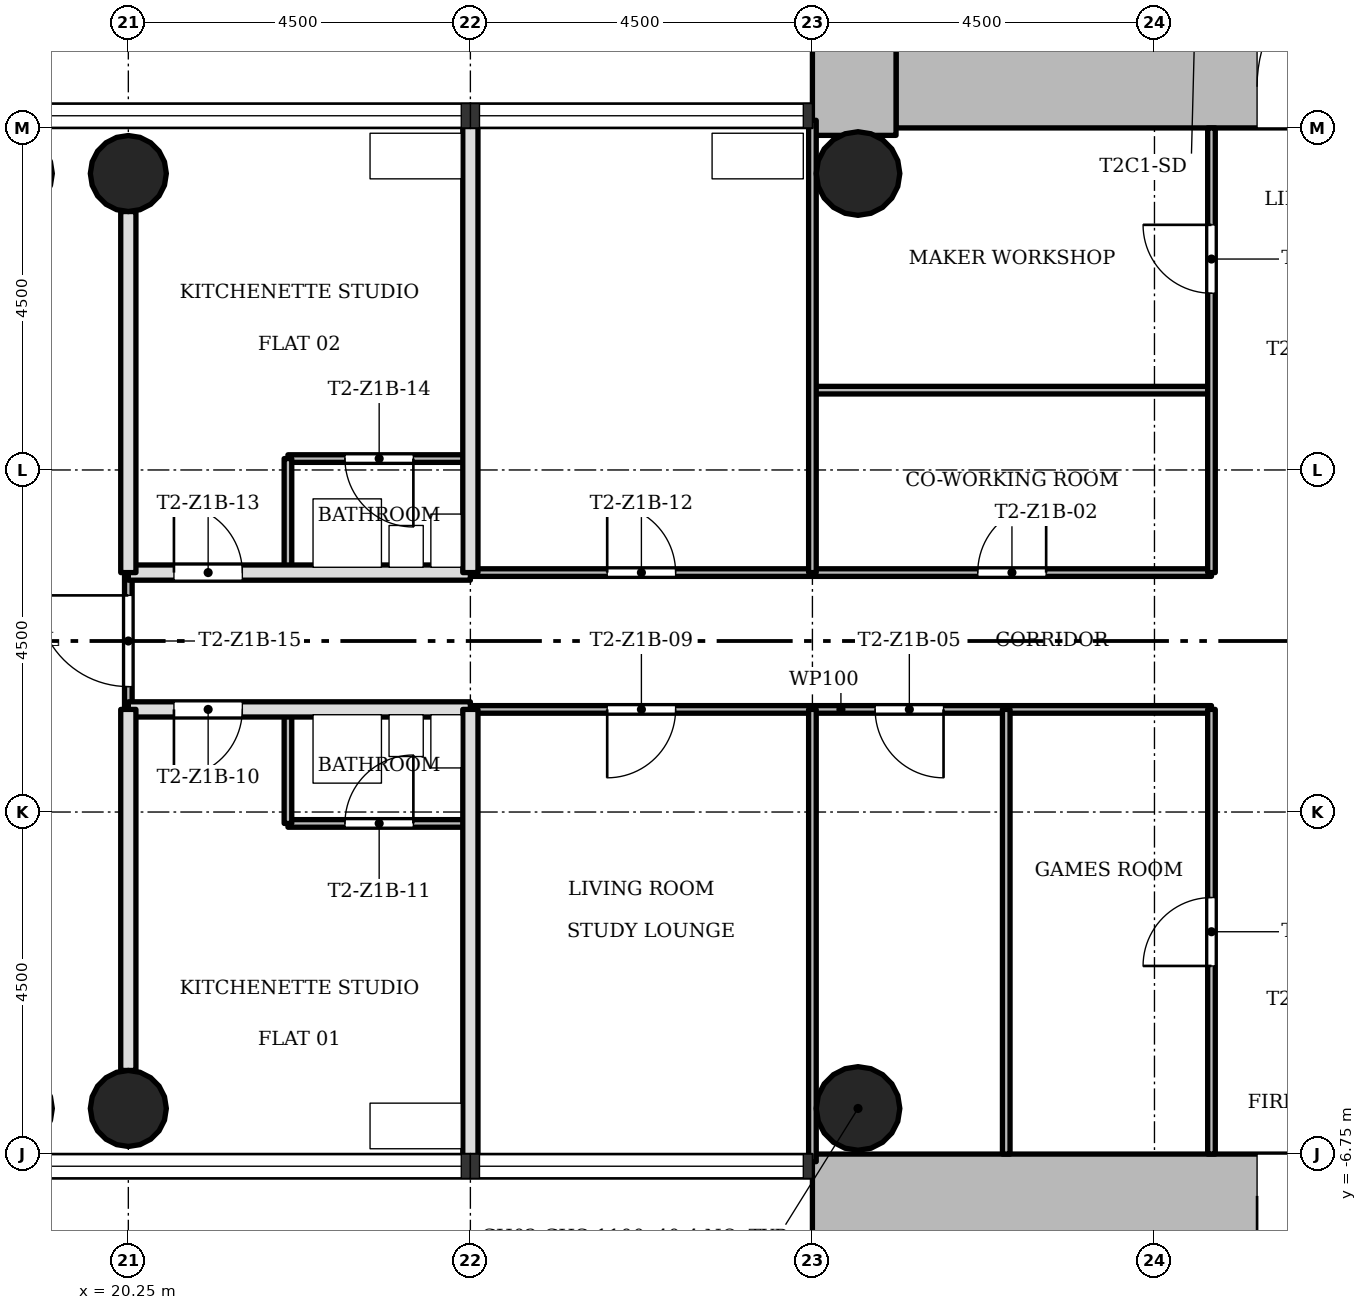
"""IFC4 building model, lengths in metres.
Left out: names, types, materials, properties, quantities, classifications, styles, units other than length and angle.
Written with IfcOpenShell. Run it as: python <this file> out.ifc"""

import sys

from ifc_helpers import new_model, si_unit, direction, frame, frame_2d, origin, origin_2d, place, context, subcontext, project, spatial, rectangle, hollow_circle, extrude, element, fill, save


model = new_model("IFC4")
c1 = context("Model", 3, precision=1e-05, world=origin(), true_north=direction((0.0, 1.0)))
c2 = subcontext(c1, "Body", "Model", "MODEL_VIEW")
j1 = project(units=[si_unit("LENGTHUNIT", "METRE"), si_unit("PLANEANGLEUNIT", "RADIAN")], contexts=[c1])
p1 = place(None, origin())
s1 = spatial("IfcSite", under=j1, at=p1, CompositionType="ELEMENT")
p2 = place(p1, origin())
s2 = spatial("IfcBuilding", under=s1, at=p2, CompositionType="ELEMENT")
p3 = place(p2, frame((0.0, 0.0, 34.7)))
s3 = spatial("IfcBuildingStorey", under=s2, at=p3, CompositionType="ELEMENT", Elevation=34.7)
p4 = place(p3, frame((30.35, 7.3, 0.0), z_axis=(0.0, 0.0, 1.0), x_axis=(1.0, 0.0, 0.0)))
e1 = element("IfcWall", 1, at=p4, inside=s3, PredefinedType="SHEAR", context=c2, shape_type="SweptSolid", body=[
    extrude(rectangle(XDim=12.4, YDim=1.1, at=frame_2d((6.2, 0.0))), origin(), (0.0, 0.0, 1.0), 3.4),
])
p5 = place(p4, frame((4.75, 0.0, 0.0)))
e2 = element("IfcOpeningElement", 2, at=p5, cuts=e1, PredefinedType="OPENING", context=c2, shape_type="SweptSolid", body=[
    extrude(rectangle(XDim=1.8, YDim=2.1, at=frame_2d((0.9, 1.05))), frame((0.0, 0.56, 0.0), z_axis=(0.0, -1.0, 0.0), x_axis=(1.0, 0.0, 0.0)), (0.0, 0.0, 1.0), 1.12),
])
p6 = place(p3, frame((29.8, 15.248, 0.0), z_axis=(0.0, 0.0, 1.0), x_axis=(0.0, -1.0, 0.0)))
e3 = element("IfcWall", 3, at=p6, inside=s3, PredefinedType="SHEAR", context=c2, shape_type="SweptSolid", body=[
    extrude(rectangle(XDim=8.596, YDim=1.1, at=frame_2d((4.298, 0.0))), origin(), (0.0, 0.0, 1.0), 3.4),
])
p7 = place(p3, frame((41.65, -7.3, 0.0), z_axis=(0.0, 0.0, 1.0), x_axis=(-1.0, 0.0, 0.0)))
e4 = element("IfcWall", 4, at=p7, inside=s3, PredefinedType="SHEAR", context=c2, shape_type="SweptSolid", body=[
    extrude(rectangle(XDim=12.4, YDim=1.1, at=frame_2d((6.2, 0.0))), origin(), (0.0, 0.0, 1.0), 3.4),
])
p8 = place(p7, frame((4.75, 0.0, 0.0)))
e5 = element("IfcOpeningElement", 5, at=p8, cuts=e4, PredefinedType="OPENING", context=c2, shape_type="SweptSolid", body=[
    extrude(rectangle(XDim=1.8, YDim=2.1, at=frame_2d((0.9, 1.05))), frame((0.0, 0.56, 0.0), z_axis=(0.0, -1.0, 0.0), x_axis=(1.0, 0.0, 0.0)), (0.0, 0.0, 1.0), 1.12),
])
for number, where, z_axis, x_axis in (
    (6, (20.25, 6.15, 0.0), (0.0, 0.0, 1.0), (1.0, 0.0, 0.0)),
    (7, (20.25, -6.15, 0.0), (0.0, 0.0, 1.0), (1.0, 0.0, 0.0)),
):
    element("IfcColumn", number, at=place(p3, frame(where, z_axis=z_axis, x_axis=x_axis)), inside=s3, PredefinedType="COLUMN", context=c2, shape_type="SweptSolid", body=[
        extrude(hollow_circle(Radius=0.5, WallThickness=0.036, at=origin_2d()), origin(), (0.0, 0.0, 1.0), 3.4),
    ])
for number, where, z_axis, x_axis in (
    (8, (29.85, 6.15, 0.0), (0.0, 0.0, 1.0), (1.0, 0.0, 0.0)),
    (9, (29.85, -6.15, 0.0), (0.0, 0.0, 1.0), (1.0, 0.0, 0.0)),
):
    element("IfcColumn", number, at=place(p3, frame(where, z_axis=z_axis, x_axis=x_axis)), inside=s3, PredefinedType="COLUMN", context=c2, shape_type="SweptSolid", body=[
        extrude(hollow_circle(Radius=0.55, WallThickness=0.04, at=origin_2d()), origin(), (0.0, 0.0, 1.0), 3.4),
    ])
p9 = place(p3, frame((24.75, -2.4, 0.0), z_axis=(0.0, 0.0, 1.0), x_axis=(-1.0, 0.0, 0.0)))
e10 = element("IfcWall", 10, at=p9, inside=s3, PredefinedType="PARTITIONING", context=c2, shape_type="SweptSolid", body=[
    extrude(rectangle(XDim=2.4, YDim=0.1, at=frame_2d((1.2, 0.0))), origin(), (0.0, 0.0, 1.0), 3.0),
])
p10 = place(p9, frame((0.75, 0.0, 0.0)))
e11 = element("IfcOpeningElement", 11, at=p10, cuts=e10, PredefinedType="OPENING", context=c2, shape_type="SweptSolid", body=[
    extrude(rectangle(XDim=0.9, YDim=2.1, at=frame_2d((0.45, 1.05))), frame((0.0, 0.06, 0.0), z_axis=(0.0, -1.0, 0.0), x_axis=(1.0, 0.0, 0.0)), (0.0, 0.0, 1.0), 0.12),
])
p11 = place(p3, frame((34.5, -0.9, 0.0), z_axis=(0.0, 0.0, 1.0), x_axis=(-1.0, 0.0, 0.0)))
e12 = element("IfcWall", 12, at=p11, inside=s3, PredefinedType="PARTITIONING", context=c2, shape_type="SweptSolid", body=[
    extrude(rectangle(XDim=9.75, YDim=0.1, at=frame_2d((4.875, 0.0))), origin(), (0.0, 0.0, 1.0), 3.0),
])
p12 = place(p11, frame((3.525, 0.0, 0.0)))
e13 = element("IfcOpeningElement", 13, at=p12, cuts=e12, PredefinedType="OPENING", context=c2, shape_type="SweptSolid", body=[
    extrude(rectangle(XDim=0.9, YDim=2.1, at=frame_2d((0.45, 1.05))), frame((0.0, 0.06, 0.0), z_axis=(0.0, -1.0, 0.0), x_axis=(1.0, 0.0, 0.0)), (0.0, 0.0, 1.0), 0.12),
])
p13 = place(p11, frame((7.05, 0.0, 0.0)))
e14 = element("IfcOpeningElement", 14, at=p13, cuts=e12, PredefinedType="OPENING", context=c2, shape_type="SweptSolid", body=[
    extrude(rectangle(XDim=0.9, YDim=2.1, at=frame_2d((0.45, 1.05))), frame((0.0, 0.06, 0.0), z_axis=(0.0, -1.0, 0.0), x_axis=(1.0, 0.0, 0.0)), (0.0, 0.0, 1.0), 0.12),
])
p14 = place(p3, frame((24.75, -0.9, 0.0), z_axis=(0.0, 0.0, 1.0), x_axis=(-1.0, 0.0, 0.0)))
e15 = element("IfcWall", 15, at=p14, inside=s3, PredefinedType="SOLIDWALL", context=c2, shape_type="SweptSolid", body=[
    extrude(rectangle(XDim=4.5, YDim=0.2, at=frame_2d((2.25, 0.0))), origin(), (0.0, 0.0, 1.0), 3.0),
])
p15 = place(p14, frame((3.0, 0.0, 0.0)))
e16 = element("IfcOpeningElement", 16, at=p15, cuts=e15, PredefinedType="OPENING", context=c2, shape_type="SweptSolid", body=[
    extrude(rectangle(XDim=0.9, YDim=2.1, at=frame_2d((0.45, 1.05))), frame((0.0, 0.11, 0.0), z_axis=(0.0, -1.0, 0.0), x_axis=(1.0, 0.0, 0.0)), (0.0, 0.0, 1.0), 0.22),
])
p16 = place(p3, frame((34.5, 0.9, 0.0), z_axis=(0.0, 0.0, 1.0), x_axis=(-1.0, 0.0, 0.0)))
e17 = element("IfcWall", 17, at=p16, inside=s3, PredefinedType="PARTITIONING", context=c2, shape_type="SweptSolid", body=[
    extrude(rectangle(XDim=9.75, YDim=0.1, at=frame_2d((4.875, 0.0))), origin(), (0.0, 0.0, 1.0), 3.0),
])
p17 = place(p16, frame((2.175, 0.0, 0.0)))
e18 = element("IfcOpeningElement", 18, at=p17, cuts=e17, PredefinedType="OPENING", context=c2, shape_type="SweptSolid", body=[
    extrude(rectangle(XDim=0.9, YDim=2.1, at=frame_2d((0.45, 1.05))), frame((0.0, 0.06, 0.0), z_axis=(0.0, -1.0, 0.0), x_axis=(1.0, 0.0, 0.0)), (0.0, 0.0, 1.0), 0.12),
])
p18 = place(p16, frame((7.05, 0.0, 0.0)))
e19 = element("IfcOpeningElement", 19, at=p18, cuts=e17, PredefinedType="OPENING", context=c2, shape_type="SweptSolid", body=[
    extrude(rectangle(XDim=0.9, YDim=2.1, at=frame_2d((0.45, 1.05))), frame((0.0, 0.06, 0.0), z_axis=(0.0, -1.0, 0.0), x_axis=(1.0, 0.0, 0.0)), (0.0, 0.0, 1.0), 0.12),
])
p19 = place(p3, frame((24.75, 0.9, 0.0), z_axis=(0.0, 0.0, 1.0), x_axis=(-1.0, 0.0, 0.0)))
e20 = element("IfcWall", 20, at=p19, inside=s3, PredefinedType="SOLIDWALL", context=c2, shape_type="SweptSolid", body=[
    extrude(rectangle(XDim=4.5, YDim=0.2, at=frame_2d((2.25, 0.0))), origin(), (0.0, 0.0, 1.0), 3.0),
])
p20 = place(p19, frame((3.0, 0.0, 0.0)))
e21 = element("IfcOpeningElement", 21, at=p20, cuts=e20, PredefinedType="OPENING", context=c2, shape_type="SweptSolid", body=[
    extrude(rectangle(XDim=0.9, YDim=2.1, at=frame_2d((0.45, 1.05))), frame((0.0, 0.11, 0.0), z_axis=(0.0, -1.0, 0.0), x_axis=(1.0, 0.0, 0.0)), (0.0, 0.0, 1.0), 0.22),
])
p21 = place(p3, frame((24.75, 2.4, 0.0), z_axis=(0.0, 0.0, 1.0), x_axis=(-1.0, 0.0, 0.0)))
e22 = element("IfcWall", 22, at=p21, inside=s3, PredefinedType="PARTITIONING", context=c2, shape_type="SweptSolid", body=[
    extrude(rectangle(XDim=2.4, YDim=0.1, at=frame_2d((1.2, 0.0))), origin(), (0.0, 0.0, 1.0), 3.0),
])
p22 = place(p21, frame((0.75, 0.0, 0.0)))
e23 = element("IfcOpeningElement", 23, at=p22, cuts=e22, PredefinedType="OPENING", context=c2, shape_type="SweptSolid", body=[
    extrude(rectangle(XDim=0.9, YDim=2.1, at=frame_2d((0.45, 1.05))), frame((0.0, 0.06, 0.0), z_axis=(0.0, -1.0, 0.0), x_axis=(1.0, 0.0, 0.0)), (0.0, 0.0, 1.0), 0.12),
])
p23 = place(p3, frame((34.5, 3.3, 0.0), z_axis=(0.0, 0.0, 1.0), x_axis=(-1.0, 0.0, 0.0)))
e24 = element("IfcWall", 24, at=p23, inside=s3, PredefinedType="PARTITIONING", context=c2, shape_type="SweptSolid", body=[
    extrude(rectangle(XDim=5.25, YDim=0.1, at=frame_2d((2.625, 0.0))), origin(), (0.0, 0.0, 1.0), 3.0),
])
p24 = place(p3, frame((34.5, -6.75, 0.0), z_axis=(0.0, 0.0, 1.0), x_axis=(0.0, 1.0, 0.0)))
e25 = element("IfcWall", 25, at=p24, inside=s3, PredefinedType="PARTITIONING", context=c2, shape_type="SweptSolid", body=[
    extrude(rectangle(XDim=5.85, YDim=0.1, at=frame_2d((2.925, 0.0))), origin(), (0.0, 0.0, 1.0), 3.0),
])
p25 = place(p24, frame((2.475, 0.0, 0.0)))
e26 = element("IfcOpeningElement", 26, at=p25, cuts=e25, PredefinedType="OPENING", context=c2, shape_type="SweptSolid", body=[
    extrude(rectangle(XDim=0.9, YDim=2.1, at=frame_2d((0.45, 1.05))), frame((0.0, 0.06, 0.0), z_axis=(0.0, -1.0, 0.0), x_axis=(1.0, 0.0, 0.0)), (0.0, 0.0, 1.0), 0.12),
])
p26 = place(p3, frame((34.5, 0.9, 0.0), z_axis=(0.0, 0.0, 1.0), x_axis=(0.0, 1.0, 0.0)))
e27 = element("IfcWall", 27, at=p26, inside=s3, PredefinedType="PARTITIONING", context=c2, shape_type="SweptSolid", body=[
    extrude(rectangle(XDim=5.85, YDim=0.1, at=frame_2d((2.925, 0.0))), origin(), (0.0, 0.0, 1.0), 3.0),
])
p27 = place(p26, frame((3.675, 0.0, 0.0)))
e28 = element("IfcOpeningElement", 28, at=p27, cuts=e27, PredefinedType="OPENING", context=c2, shape_type="SweptSolid", body=[
    extrude(rectangle(XDim=0.9, YDim=2.1, at=frame_2d((0.45, 1.05))), frame((0.0, 0.06, 0.0), z_axis=(0.0, -1.0, 0.0), x_axis=(1.0, 0.0, 0.0)), (0.0, 0.0, 1.0), 0.12),
])
p28 = place(p3, frame((31.8, -6.75, 0.0), z_axis=(0.0, 0.0, 1.0), x_axis=(0.0, 1.0, 0.0)))
e29 = element("IfcWall", 29, at=p28, inside=s3, PredefinedType="PARTITIONING", context=c2, shape_type="SweptSolid", body=[
    extrude(rectangle(XDim=5.85, YDim=0.1, at=frame_2d((2.925, 0.0))), origin(), (0.0, 0.0, 1.0), 3.0),
])
for number, where, z_axis, x_axis in (
    (30, (29.25, -6.85, 0.0), (0.0, 0.0, 1.0), (0.0, 1.0, 0.0)),
    (31, (29.25, 0.9, 0.0), (0.0, 0.0, 1.0), (0.0, 1.0, 0.0)),
):
    element("IfcWall", number, at=place(p3, frame(where, z_axis=z_axis, x_axis=x_axis)), inside=s3, PredefinedType="PARTITIONING", context=c2, shape_type="SweptSolid", body=[
        extrude(rectangle(XDim=5.95, YDim=0.1, at=frame_2d((2.975, 0.0))), origin(), (0.0, 0.0, 1.0), 3.0),
    ])
for number, where, z_axis, x_axis in (
    (32, (24.75, -6.85, 0.0), (0.0, 0.0, 1.0), (0.0, 1.0, 0.0)),
    (33, (24.75, 0.9, 0.0), (0.0, 0.0, 1.0), (0.0, 1.0, 0.0)),
):
    element("IfcWall", number, at=place(p3, frame(where, z_axis=z_axis, x_axis=x_axis)), inside=s3, PredefinedType="SOLIDWALL", context=c2, shape_type="SweptSolid", body=[
        extrude(rectangle(XDim=5.95, YDim=0.2, at=frame_2d((2.975, 0.0))), origin(), (0.0, 0.0, 1.0), 3.0),
    ])
for number, where, z_axis, x_axis in (
    (34, (22.35, -2.4, 0.0), (0.0, 0.0, 1.0), (0.0, 1.0, 0.0)),
    (35, (22.35, 0.9, 0.0), (0.0, 0.0, 1.0), (0.0, 1.0, 0.0)),
):
    element("IfcWall", number, at=place(p3, frame(where, z_axis=z_axis, x_axis=x_axis)), inside=s3, PredefinedType="PARTITIONING", context=c2, shape_type="SweptSolid", body=[
        extrude(rectangle(XDim=1.5, YDim=0.1, at=frame_2d((0.75, 0.0))), origin(), (0.0, 0.0, 1.0), 3.0),
    ])
p29 = place(p3, frame((20.25, -0.9, 0.0), z_axis=(0.0, 0.0, 1.0), x_axis=(0.0, 1.0, 0.0)))
e36 = element("IfcWall", 36, at=p29, inside=s3, PredefinedType="PARTITIONING", context=c2, shape_type="SweptSolid", body=[
    extrude(rectangle(XDim=1.8, YDim=0.1, at=frame_2d((0.9, 0.0))), origin(), (0.0, 0.0, 1.0), 3.0),
])
p30 = place(p29, frame((0.3, 0.0, 0.0)))
e37 = element("IfcOpeningElement", 37, at=p30, cuts=e36, PredefinedType="OPENING", context=c2, shape_type="SweptSolid", body=[
    extrude(rectangle(XDim=1.2, YDim=2.1, at=frame_2d((0.6, 1.05))), frame((0.0, 0.06, 0.0), z_axis=(0.0, -1.0, 0.0), x_axis=(1.0, 0.0, 0.0)), (0.0, 0.0, 1.0), 0.12),
])
for number, where, z_axis, x_axis in (
    (38, (20.25, -5.65, 0.0), (0.0, 0.0, 1.0), (0.0, 1.0, 0.0)),
    (39, (20.25, 0.9, 0.0), (0.0, 0.0, 1.0), (0.0, 1.0, 0.0)),
):
    element("IfcWall", number, at=place(p3, frame(where, z_axis=z_axis, x_axis=x_axis)), inside=s3, PredefinedType="SOLIDWALL", context=c2, shape_type="SweptSolid", body=[
        extrude(rectangle(XDim=4.75, YDim=0.2, at=frame_2d((2.375, 0.0))), origin(), (0.0, 0.0, 1.0), 3.0),
    ])
p31 = place(p17, origin())
e40 = element("IfcDoor", 40, at=p31, inside=s3, OperationType="SINGLE_SWING_LEFT", PredefinedType="DOOR", context=c2, shape_type="SweptSolid", body=[
    extrude(rectangle(XDim=0.9, YDim=2.1, at=frame_2d((0.45, 1.05))), frame((0.0, 0.025, 0.0), z_axis=(0.0, -1.0, 0.0), x_axis=(1.0, 0.0, 0.0)), (0.0, 0.0, 1.0), 0.05),
])
fill(e18, e40)
p32 = place(p27, origin())
e41 = element("IfcDoor", 41, at=p32, inside=s3, OperationType="SINGLE_SWING_LEFT", PredefinedType="DOOR", context=c2, shape_type="SweptSolid", body=[
    extrude(rectangle(XDim=0.9, YDim=2.1, at=frame_2d((0.45, 1.05))), frame((0.0, 0.025, 0.0), z_axis=(0.0, -1.0, 0.0), x_axis=(1.0, 0.0, 0.0)), (0.0, 0.0, 1.0), 0.05),
])
fill(e28, e41)
p33 = place(p25, origin())
e42 = element("IfcDoor", 42, at=p33, inside=s3, OperationType="SINGLE_SWING_RIGHT", PredefinedType="DOOR", context=c2, shape_type="SweptSolid", body=[
    extrude(rectangle(XDim=0.9, YDim=2.1, at=frame_2d((0.45, 1.05))), frame((0.0, 0.025, 0.0), z_axis=(0.0, -1.0, 0.0), x_axis=(1.0, 0.0, 0.0)), (0.0, 0.0, 1.0), 0.05),
])
fill(e26, e42)
p34 = place(p12, origin())
e43 = element("IfcDoor", 43, at=p34, inside=s3, OperationType="SINGLE_SWING_RIGHT", PredefinedType="DOOR", context=c2, shape_type="SweptSolid", body=[
    extrude(rectangle(XDim=0.9, YDim=2.1, at=frame_2d((0.45, 1.05))), frame((0.0, 0.025, 0.0), z_axis=(0.0, -1.0, 0.0), x_axis=(1.0, 0.0, 0.0)), (0.0, 0.0, 1.0), 0.05),
])
fill(e13, e43)
p35 = place(p13, origin())
e44 = element("IfcDoor", 44, at=p35, inside=s3, OperationType="SINGLE_SWING_LEFT", PredefinedType="DOOR", context=c2, shape_type="SweptSolid", body=[
    extrude(rectangle(XDim=0.9, YDim=2.1, at=frame_2d((0.45, 1.05))), frame((0.0, 0.025, 0.0), z_axis=(0.0, -1.0, 0.0), x_axis=(1.0, 0.0, 0.0)), (0.0, 0.0, 1.0), 0.05),
])
fill(e14, e44)
p36 = place(p15, origin())
e45 = element("IfcDoor", 45, at=p36, inside=s3, OperationType="SINGLE_SWING_LEFT", PredefinedType="DOOR", context=c2, shape_type="SweptSolid", body=[
    extrude(rectangle(XDim=0.9, YDim=2.1, at=frame_2d((0.45, 1.05))), frame((0.0, 0.025, 0.0), z_axis=(0.0, -1.0, 0.0), x_axis=(1.0, 0.0, 0.0)), (0.0, 0.0, 1.0), 0.05),
])
fill(e16, e45)
p37 = place(p10, origin())
e46 = element("IfcDoor", 46, at=p37, inside=s3, OperationType="SINGLE_SWING_LEFT", PredefinedType="DOOR", context=c2, shape_type="SweptSolid", body=[
    extrude(rectangle(XDim=0.9, YDim=2.1, at=frame_2d((0.45, 1.05))), frame((0.0, 0.025, 0.0), z_axis=(0.0, -1.0, 0.0), x_axis=(1.0, 0.0, 0.0)), (0.0, 0.0, 1.0), 0.05),
])
fill(e11, e46)
p38 = place(p18, origin())
e47 = element("IfcDoor", 47, at=p38, inside=s3, OperationType="SINGLE_SWING_RIGHT", PredefinedType="DOOR", context=c2, shape_type="SweptSolid", body=[
    extrude(rectangle(XDim=0.9, YDim=2.1, at=frame_2d((0.45, 1.05))), frame((0.0, 0.025, 0.0), z_axis=(0.0, -1.0, 0.0), x_axis=(1.0, 0.0, 0.0)), (0.0, 0.0, 1.0), 0.05),
])
fill(e19, e47)
p39 = place(p20, origin())
e48 = element("IfcDoor", 48, at=p39, inside=s3, OperationType="SINGLE_SWING_RIGHT", PredefinedType="DOOR", context=c2, shape_type="SweptSolid", body=[
    extrude(rectangle(XDim=0.9, YDim=2.1, at=frame_2d((0.45, 1.05))), frame((0.0, 0.025, 0.0), z_axis=(0.0, -1.0, 0.0), x_axis=(1.0, 0.0, 0.0)), (0.0, 0.0, 1.0), 0.05),
])
fill(e21, e48)
p40 = place(p22, origin())
e49 = element("IfcDoor", 49, at=p40, inside=s3, OperationType="SINGLE_SWING_RIGHT", PredefinedType="DOOR", context=c2, shape_type="SweptSolid", body=[
    extrude(rectangle(XDim=0.9, YDim=2.1, at=frame_2d((0.45, 1.05))), frame((0.0, 0.025, 0.0), z_axis=(0.0, -1.0, 0.0), x_axis=(1.0, 0.0, 0.0)), (0.0, 0.0, 1.0), 0.05),
])
fill(e23, e49)
p41 = place(p30, origin())
e50 = element("IfcDoor", 50, at=p41, inside=s3, OperationType="SINGLE_SWING_LEFT", PredefinedType="DOOR", context=c2, shape_type="SweptSolid", body=[
    extrude(rectangle(XDim=1.2, YDim=2.1, at=frame_2d((0.6, 1.05))), frame((0.0, 0.025, 0.0), z_axis=(0.0, -1.0, 0.0), x_axis=(1.0, 0.0, 0.0)), (0.0, 0.0, 1.0), 0.05),
])
fill(e37, e50)
p42 = place(p5, origin())
e51 = element("IfcDoor", 51, at=p42, inside=s3, OperationType="SINGLE_SWING_LEFT", PredefinedType="DOOR", context=c2, shape_type="SweptSolid", body=[
    extrude(rectangle(XDim=1.8, YDim=2.1, at=frame_2d((0.9, 1.05))), frame((0.0, 0.025, 0.0), z_axis=(0.0, -1.0, 0.0), x_axis=(1.0, 0.0, 0.0)), (0.0, 0.0, 1.0), 0.05),
])
fill(e2, e51)
p43 = place(p8, origin())
e52 = element("IfcDoor", 52, at=p43, inside=s3, OperationType="SINGLE_SWING_LEFT", PredefinedType="DOOR", context=c2, shape_type="SweptSolid", body=[
    extrude(rectangle(XDim=1.8, YDim=2.1, at=frame_2d((0.9, 1.05))), frame((0.0, 0.025, 0.0), z_axis=(0.0, -1.0, 0.0), x_axis=(1.0, 0.0, 0.0)), (0.0, 0.0, 1.0), 0.05),
])
fill(e5, e52)
save(model, sys.argv[1])
